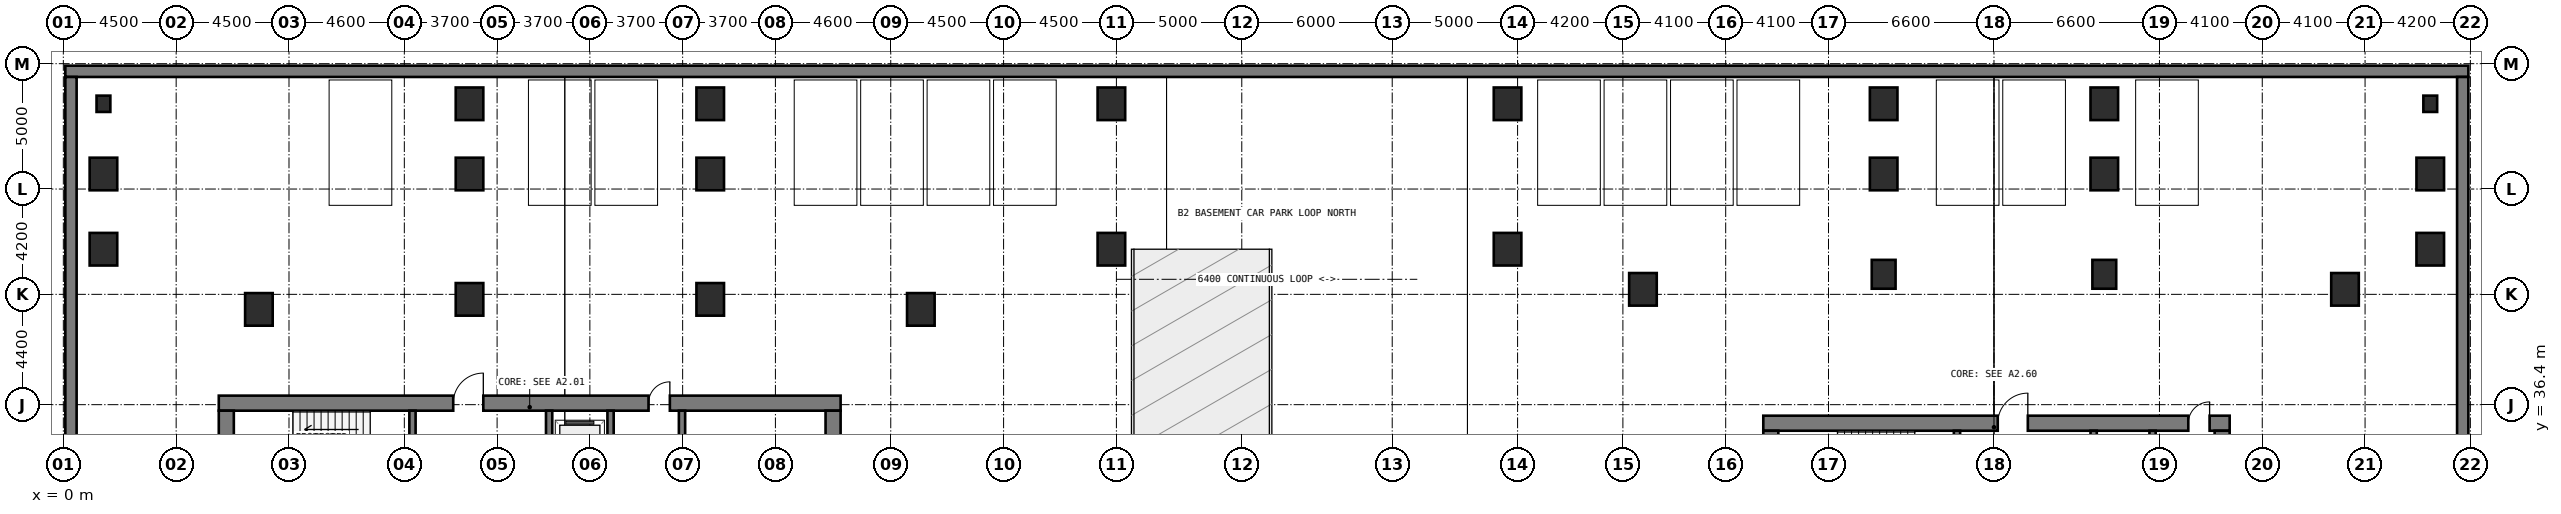
"""IFC4 building model, lengths in metres.
Left out: names, types, materials, properties, quantities, classifications, styles, units other than length and angle.
Written with IfcOpenShell. Run it as: python <this file> out.ifc"""

import sys

from ifc_helpers import new_model, si_unit, direction, frame, frame_2d, origin, origin_2d, place, context, subcontext, project, spatial, rectangle, extrude, element, fill, save


model = new_model("IFC4")
c1 = context("Model", 3, precision=1e-05, world=origin(), true_north=direction((0.0, 1.0)))
c2 = subcontext(c1, "Body", "Model", "MODEL_VIEW")
j1 = project(units=[si_unit("LENGTHUNIT", "METRE"), si_unit("PLANEANGLEUNIT", "RADIAN")], contexts=[c1])
p1 = place(None, origin())
s1 = spatial("IfcSite", under=j1, at=p1, CompositionType="ELEMENT")
p2 = place(p1, origin())
s2 = spatial("IfcBuilding", under=s1, at=p2, CompositionType="ELEMENT")
p3 = place(p2, frame((0.0, 0.0, -8.4)))
s3 = spatial("IfcBuildingStorey", under=s2, at=p3, CompositionType="ELEMENT", Elevation=-8.4)
p4 = place(p3, frame((95.92, 49.695, 0.0), z_axis=(0.0, 0.0, 1.0), x_axis=(-1.0, 0.0, 0.0)))
e1 = element("IfcWall", 1, at=p4, inside=s3, PredefinedType="USERDEFINED", context=c2, shape_type="SweptSolid", body=[
    extrude(rectangle(XDim=95.84, YDim=0.45, at=frame_2d((47.92, 0.0))), origin(), (0.0, 0.0, 1.0), 4.2),
])
for number, where, z_axis, x_axis in (
    (2, (0.305, 49.47, 0.0), (0.0, 0.0, 1.0), (0.0, -1.0, 0.0)),
    (3, (95.695, 0.53, 0.0), (0.0, 0.0, 1.0), (0.0, 1.0, 0.0)),
):
    element("IfcWall", number, at=place(p3, frame(where, z_axis=z_axis, x_axis=x_axis)), inside=s3, PredefinedType="USERDEFINED", context=c2, shape_type="SweptSolid", body=[
        extrude(rectangle(XDim=48.94, YDim=0.45, at=frame_2d((24.47, 0.0))), origin(), (0.0, 0.0, 1.0), 4.2),
    ])
p5 = place(p3, frame((6.2, 36.46, 0.0), z_axis=(0.0, 0.0, 1.0), x_axis=(1.0, 0.0, 0.0)))
e4 = element("IfcWall", 4, at=p5, inside=s3, PredefinedType="SHEAR", context=c2, shape_type="SweptSolid", body=[
    extrude(rectangle(XDim=24.8, YDim=0.6, at=frame_2d((12.4, 0.0))), origin(), (0.0, 0.0, 1.0), 4.2),
])
p6 = place(p5, frame((9.35, 0.0, 0.0)))
e5 = element("IfcOpeningElement", 5, at=p6, cuts=e4, PredefinedType="OPENING", context=c2, shape_type="SweptSolid", body=[
    extrude(rectangle(XDim=1.2, YDim=2.15, at=frame_2d((0.6, 1.075))), frame((0.0, 0.31, 0.0), z_axis=(0.0, -1.0, 0.0), x_axis=(1.0, 0.0, 0.0)), (0.0, 0.0, 1.0), 0.62),
])
p7 = place(p5, frame((17.14, 0.0, 0.0)))
e6 = element("IfcOpeningElement", 6, at=p7, cuts=e4, PredefinedType="OPENING", context=c2, shape_type="SweptSolid", body=[
    extrude(rectangle(XDim=0.85, YDim=2.1, at=frame_2d((0.425, 1.05))), frame((0.0, 0.31, 0.0), z_axis=(0.0, -1.0, 0.0), x_axis=(1.0, 0.0, 0.0)), (0.0, 0.0, 1.0), 0.62),
])
for number, where, z_axis, x_axis in (
    (7, (6.5, 33.0, 0.0), (0.0, 0.0, 1.0), (0.0, 1.0, 0.0)),
    (8, (30.7, 33.0, 0.0), (0.0, 0.0, 1.0), (0.0, 1.0, 0.0)),
):
    element("IfcWall", number, at=place(p3, frame(where, z_axis=z_axis, x_axis=x_axis)), inside=s3, PredefinedType="SHEAR", context=c2, shape_type="SweptSolid", body=[
        extrude(rectangle(XDim=3.16, YDim=0.6, at=frame_2d((1.58, 0.0))), origin(), (0.0, 0.0, 1.0), 4.2),
    ])
p8 = place(p3, frame((13.925, 33.0, 0.0), z_axis=(0.0, 0.0, 1.0), x_axis=(0.0, 1.0, 0.0)))
e9 = element("IfcWall", 9, at=p8, inside=s3, PredefinedType="STANDARD", context=c2, shape_type="SweptSolid", body=[
    extrude(rectangle(XDim=3.16, YDim=0.25, at=frame_2d((1.58, 0.0))), origin(), (0.0, 0.0, 1.0), 3.88),
])
p9 = place(p8, frame((0.98, 0.0, 0.0)))
e10 = element("IfcOpeningElement", 10, at=p9, cuts=e9, PredefinedType="OPENING", context=c2, shape_type="SweptSolid", body=[
    extrude(rectangle(XDim=1.1, YDim=2.15, at=frame_2d((0.55, 1.075))), frame((0.0, 0.135, 0.0), z_axis=(0.0, -1.0, 0.0), x_axis=(1.0, 0.0, 0.0)), (0.0, 0.0, 1.0), 0.27),
])
p10 = place(p3, frame((19.375, 33.0, 0.0), z_axis=(0.0, 0.0, 1.0), x_axis=(0.0, 1.0, 0.0)))
e11 = element("IfcWall", 11, at=p10, inside=s3, PredefinedType="STANDARD", context=c2, shape_type="SweptSolid", body=[
    extrude(rectangle(XDim=3.16, YDim=0.25, at=frame_2d((1.58, 0.0))), origin(), (0.0, 0.0, 1.0), 3.88),
])
p11 = place(p10, frame((0.98, 0.0, 0.0)))
e12 = element("IfcOpeningElement", 12, at=p11, cuts=e11, PredefinedType="OPENING", context=c2, shape_type="SweptSolid", body=[
    extrude(rectangle(XDim=1.1, YDim=2.15, at=frame_2d((0.55, 1.075))), frame((0.0, 0.135, 0.0), z_axis=(0.0, -1.0, 0.0), x_axis=(1.0, 0.0, 0.0)), (0.0, 0.0, 1.0), 0.27),
])
for number, where, z_axis, x_axis in (
    (13, (21.825, 33.0, 0.0), (0.0, 0.0, 1.0), (0.0, 1.0, 0.0)),
    (14, (24.675, 33.0, 0.0), (0.0, 0.0, 1.0), (0.0, 1.0, 0.0)),
):
    element("IfcWall", number, at=place(p3, frame(where, z_axis=z_axis, x_axis=x_axis)), inside=s3, PredefinedType="STANDARD", context=c2, shape_type="SweptSolid", body=[
        extrude(rectangle(XDim=3.16, YDim=0.25, at=frame_2d((1.58, 0.0))), origin(), (0.0, 0.0, 1.0), 3.88),
    ])
p12 = place(p3, frame((67.8, 35.66, 0.0), z_axis=(0.0, 0.0, 1.0), x_axis=(1.0, 0.0, 0.0)))
e15 = element("IfcWall", 15, at=p12, inside=s3, PredefinedType="SHEAR", context=c2, shape_type="SweptSolid", body=[
    extrude(rectangle(XDim=18.6, YDim=0.6, at=frame_2d((9.3, 0.0))), origin(), (0.0, 0.0, 1.0), 4.2),
])
p13 = place(p12, frame((9.35, 0.0, 0.0)))
e16 = element("IfcOpeningElement", 16, at=p13, cuts=e15, PredefinedType="OPENING", context=c2, shape_type="SweptSolid", body=[
    extrude(rectangle(XDim=1.2, YDim=2.15, at=frame_2d((0.6, 1.075))), frame((0.0, 0.31, 0.0), z_axis=(0.0, -1.0, 0.0), x_axis=(1.0, 0.0, 0.0)), (0.0, 0.0, 1.0), 0.62),
])
p14 = place(p12, frame((16.95, 0.0, 0.0)))
e17 = element("IfcOpeningElement", 17, at=p14, cuts=e15, PredefinedType="OPENING", context=c2, shape_type="SweptSolid", body=[
    extrude(rectangle(XDim=0.85, YDim=2.1, at=frame_2d((0.425, 1.05))), frame((0.0, 0.31, 0.0), z_axis=(0.0, -1.0, 0.0), x_axis=(1.0, 0.0, 0.0)), (0.0, 0.0, 1.0), 0.62),
])
for number, where, z_axis, x_axis in (
    (18, (68.1, 32.2, 0.0), (0.0, 0.0, 1.0), (0.0, 1.0, 0.0)),
    (19, (86.1, 32.2, 0.0), (0.0, 0.0, 1.0), (0.0, 1.0, 0.0)),
):
    element("IfcWall", number, at=place(p3, frame(where, z_axis=z_axis, x_axis=x_axis)), inside=s3, PredefinedType="SHEAR", context=c2, shape_type="SweptSolid", body=[
        extrude(rectangle(XDim=3.16, YDim=0.6, at=frame_2d((1.58, 0.0))), origin(), (0.0, 0.0, 1.0), 4.2),
    ])
p15 = place(p3, frame((75.525, 32.2, 0.0), z_axis=(0.0, 0.0, 1.0), x_axis=(0.0, 1.0, 0.0)))
e20 = element("IfcWall", 20, at=p15, inside=s3, PredefinedType="STANDARD", context=c2, shape_type="SweptSolid", body=[
    extrude(rectangle(XDim=3.16, YDim=0.25, at=frame_2d((1.58, 0.0))), origin(), (0.0, 0.0, 1.0), 3.88),
])
p16 = place(p15, frame((0.98, 0.0, 0.0)))
e21 = element("IfcOpeningElement", 21, at=p16, cuts=e20, PredefinedType="OPENING", context=c2, shape_type="SweptSolid", body=[
    extrude(rectangle(XDim=1.1, YDim=2.15, at=frame_2d((0.55, 1.075))), frame((0.0, 0.135, 0.0), z_axis=(0.0, -1.0, 0.0), x_axis=(1.0, 0.0, 0.0)), (0.0, 0.0, 1.0), 0.27),
])
p17 = place(p3, frame((80.975, 32.2, 0.0), z_axis=(0.0, 0.0, 1.0), x_axis=(0.0, 1.0, 0.0)))
e22 = element("IfcWall", 22, at=p17, inside=s3, PredefinedType="STANDARD", context=c2, shape_type="SweptSolid", body=[
    extrude(rectangle(XDim=3.16, YDim=0.25, at=frame_2d((1.58, 0.0))), origin(), (0.0, 0.0, 1.0), 3.88),
])
p18 = place(p17, frame((0.98, 0.0, 0.0)))
e23 = element("IfcOpeningElement", 23, at=p18, cuts=e22, PredefinedType="OPENING", context=c2, shape_type="SweptSolid", body=[
    extrude(rectangle(XDim=1.1, YDim=2.15, at=frame_2d((0.55, 1.075))), frame((0.0, 0.135, 0.0), z_axis=(0.0, -1.0, 0.0), x_axis=(1.0, 0.0, 0.0)), (0.0, 0.0, 1.0), 0.27),
])
p19 = place(p3, frame((83.325, 32.2, 0.0), z_axis=(0.0, 0.0, 1.0), x_axis=(0.0, 1.0, 0.0)))
e24 = element("IfcWall", 24, at=p19, inside=s3, PredefinedType="STANDARD", context=c2, shape_type="SweptSolid", body=[
    extrude(rectangle(XDim=3.16, YDim=0.25, at=frame_2d((1.58, 0.0))), origin(), (0.0, 0.0, 1.0), 3.88),
])
for number, where, z_axis, x_axis in (
    (25, (16.2, 40.6, 0.0), (0.0, 0.0, 1.0), (1.0, 0.0, 0.0)),
    (26, (25.8, 40.6, 0.0), (0.0, 0.0, 1.0), (1.0, 0.0, 0.0)),
    (27, (34.2, 40.2, 0.0), (0.0, 0.0, 1.0), (1.0, 0.0, 0.0)),
    (28, (7.8, 40.2, 0.0), (0.0, 0.0, 1.0), (1.0, 0.0, 0.0)),
):
    element("IfcColumn", number, at=place(p3, frame(where, z_axis=z_axis, x_axis=x_axis)), inside=s3, PredefinedType="COLUMN", context=c2, shape_type="SweptSolid", body=[
        extrude(rectangle(XDim=1.1, YDim=1.3, at=origin_2d()), origin(), (0.0, 0.0, 1.0), 4.2),
    ])
for number, where, z_axis, x_axis in (
    (29, (72.6, 41.6, 0.0), (0.0, 0.0, 1.0), (1.0, 0.0, 0.0)),
    (30, (81.4, 41.6, 0.0), (0.0, 0.0, 1.0), (1.0, 0.0, 0.0)),
):
    element("IfcColumn", number, at=place(p3, frame(where, z_axis=z_axis, x_axis=x_axis)), inside=s3, PredefinedType="COLUMN", context=c2, shape_type="SweptSolid", body=[
        extrude(rectangle(XDim=0.95, YDim=1.15, at=origin_2d()), origin(), (0.0, 0.0, 1.0), 4.2),
    ])
for number, where, z_axis, x_axis in (
    (31, (91.0, 41.0, 0.0), (0.0, 0.0, 1.0), (1.0, 0.0, 0.0)),
    (32, (63.0, 41.0, 0.0), (0.0, 0.0, 1.0), (1.0, 0.0, 0.0)),
):
    element("IfcColumn", number, at=place(p3, frame(where, z_axis=z_axis, x_axis=x_axis)), inside=s3, PredefinedType="COLUMN", context=c2, shape_type="SweptSolid", body=[
        extrude(rectangle(XDim=1.1, YDim=1.3, at=origin_2d()), origin(), (0.0, 0.0, 1.0), 4.2),
    ])
p20 = place(p3, frame((1.6, 48.4, 0.0), z_axis=(0.0, 0.0, 1.0), x_axis=(1.0, 0.0, 0.0)))
e33 = element("IfcColumn", 33, at=p20, inside=s3, PredefinedType="PILASTER", context=c2, shape_type="SweptSolid", body=[
    extrude(rectangle(XDim=0.55, YDim=0.65, at=origin_2d()), origin(), (0.0, 0.0, 1.0), 4.2),
])
for number, where, z_axis, x_axis in (
    (34, (16.2, 48.4, 0.0), (0.0, 0.0, 1.0), (1.0, 0.0, 0.0)),
    (35, (25.8, 48.4, 0.0), (0.0, 0.0, 1.0), (1.0, 0.0, 0.0)),
    (36, (41.8, 48.4, 0.0), (0.0, 0.0, 1.0), (1.0, 0.0, 0.0)),
    (37, (57.6, 48.4, 0.0), (0.0, 0.0, 1.0), (1.0, 0.0, 0.0)),
    (38, (72.6, 48.4, 0.0), (0.0, 0.0, 1.0), (1.0, 0.0, 0.0)),
    (39, (81.4, 48.4, 0.0), (0.0, 0.0, 1.0), (1.0, 0.0, 0.0)),
):
    element("IfcColumn", number, at=place(p3, frame(where, z_axis=z_axis, x_axis=x_axis)), inside=s3, PredefinedType="COLUMN", context=c2, shape_type="SweptSolid", body=[
        extrude(rectangle(XDim=1.1, YDim=1.3, at=origin_2d()), origin(), (0.0, 0.0, 1.0), 4.2),
    ])
p21 = place(p3, frame((94.4, 48.4, 0.0), z_axis=(0.0, 0.0, 1.0), x_axis=(1.0, 0.0, 0.0)))
e40 = element("IfcColumn", 40, at=p21, inside=s3, PredefinedType="PILASTER", context=c2, shape_type="SweptSolid", body=[
    extrude(rectangle(XDim=0.55, YDim=0.65, at=origin_2d()), origin(), (0.0, 0.0, 1.0), 4.2),
])
for number, where, z_axis, x_axis in (
    (41, (1.6, 45.6, 0.0), (0.0, 0.0, 1.0), (1.0, 0.0, 0.0)),
    (42, (16.2, 45.6, 0.0), (0.0, 0.0, 1.0), (1.0, 0.0, 0.0)),
    (43, (25.8, 45.6, 0.0), (0.0, 0.0, 1.0), (1.0, 0.0, 0.0)),
    (44, (72.6, 45.6, 0.0), (0.0, 0.0, 1.0), (1.0, 0.0, 0.0)),
    (45, (81.4, 45.6, 0.0), (0.0, 0.0, 1.0), (1.0, 0.0, 0.0)),
    (46, (94.4, 45.6, 0.0), (0.0, 0.0, 1.0), (1.0, 0.0, 0.0)),
    (47, (1.6, 42.6, 0.0), (0.0, 0.0, 1.0), (1.0, 0.0, 0.0)),
    (48, (41.8, 42.6, 0.0), (0.0, 0.0, 1.0), (1.0, 0.0, 0.0)),
    (49, (57.6, 42.6, 0.0), (0.0, 0.0, 1.0), (1.0, 0.0, 0.0)),
    (50, (94.4, 42.6, 0.0), (0.0, 0.0, 1.0), (1.0, 0.0, 0.0)),
):
    element("IfcColumn", number, at=place(p3, frame(where, z_axis=z_axis, x_axis=x_axis)), inside=s3, PredefinedType="COLUMN", context=c2, shape_type="SweptSolid", body=[
        extrude(rectangle(XDim=1.1, YDim=1.3, at=origin_2d()), origin(), (0.0, 0.0, 1.0), 4.2),
    ])
p22 = place(p6, origin())
e51 = element("IfcDoor", 51, at=p22, inside=s3, OperationType="SINGLE_SWING_RIGHT", PredefinedType="DOOR", context=c2, shape_type="SweptSolid", body=[
    extrude(rectangle(XDim=1.2, YDim=2.15, at=frame_2d((0.6, 1.075))), frame((0.0, 0.025, 0.0), z_axis=(0.0, -1.0, 0.0), x_axis=(1.0, 0.0, 0.0)), (0.0, 0.0, 1.0), 0.05),
])
fill(e5, e51)
p23 = place(p7, origin())
e52 = element("IfcDoor", 52, at=p23, inside=s3, OperationType="SINGLE_SWING_RIGHT", PredefinedType="DOOR", context=c2, shape_type="SweptSolid", body=[
    extrude(rectangle(XDim=0.85, YDim=2.1, at=frame_2d((0.425, 1.05))), frame((0.0, 0.025, 0.0), z_axis=(0.0, -1.0, 0.0), x_axis=(1.0, 0.0, 0.0)), (0.0, 0.0, 1.0), 0.05),
])
fill(e6, e52)
p24 = place(p13, origin())
e53 = element("IfcDoor", 53, at=p24, inside=s3, OperationType="SINGLE_SWING_RIGHT", PredefinedType="DOOR", context=c2, shape_type="SweptSolid", body=[
    extrude(rectangle(XDim=1.2, YDim=2.15, at=frame_2d((0.6, 1.075))), frame((0.0, 0.025, 0.0), z_axis=(0.0, -1.0, 0.0), x_axis=(1.0, 0.0, 0.0)), (0.0, 0.0, 1.0), 0.05),
])
fill(e16, e53)
p25 = place(p14, origin())
e54 = element("IfcDoor", 54, at=p25, inside=s3, OperationType="SINGLE_SWING_RIGHT", PredefinedType="DOOR", context=c2, shape_type="SweptSolid", body=[
    extrude(rectangle(XDim=0.85, YDim=2.1, at=frame_2d((0.425, 1.05))), frame((0.0, 0.025, 0.0), z_axis=(0.0, -1.0, 0.0), x_axis=(1.0, 0.0, 0.0)), (0.0, 0.0, 1.0), 0.05),
])
fill(e17, e54)
save(model, sys.argv[1])
